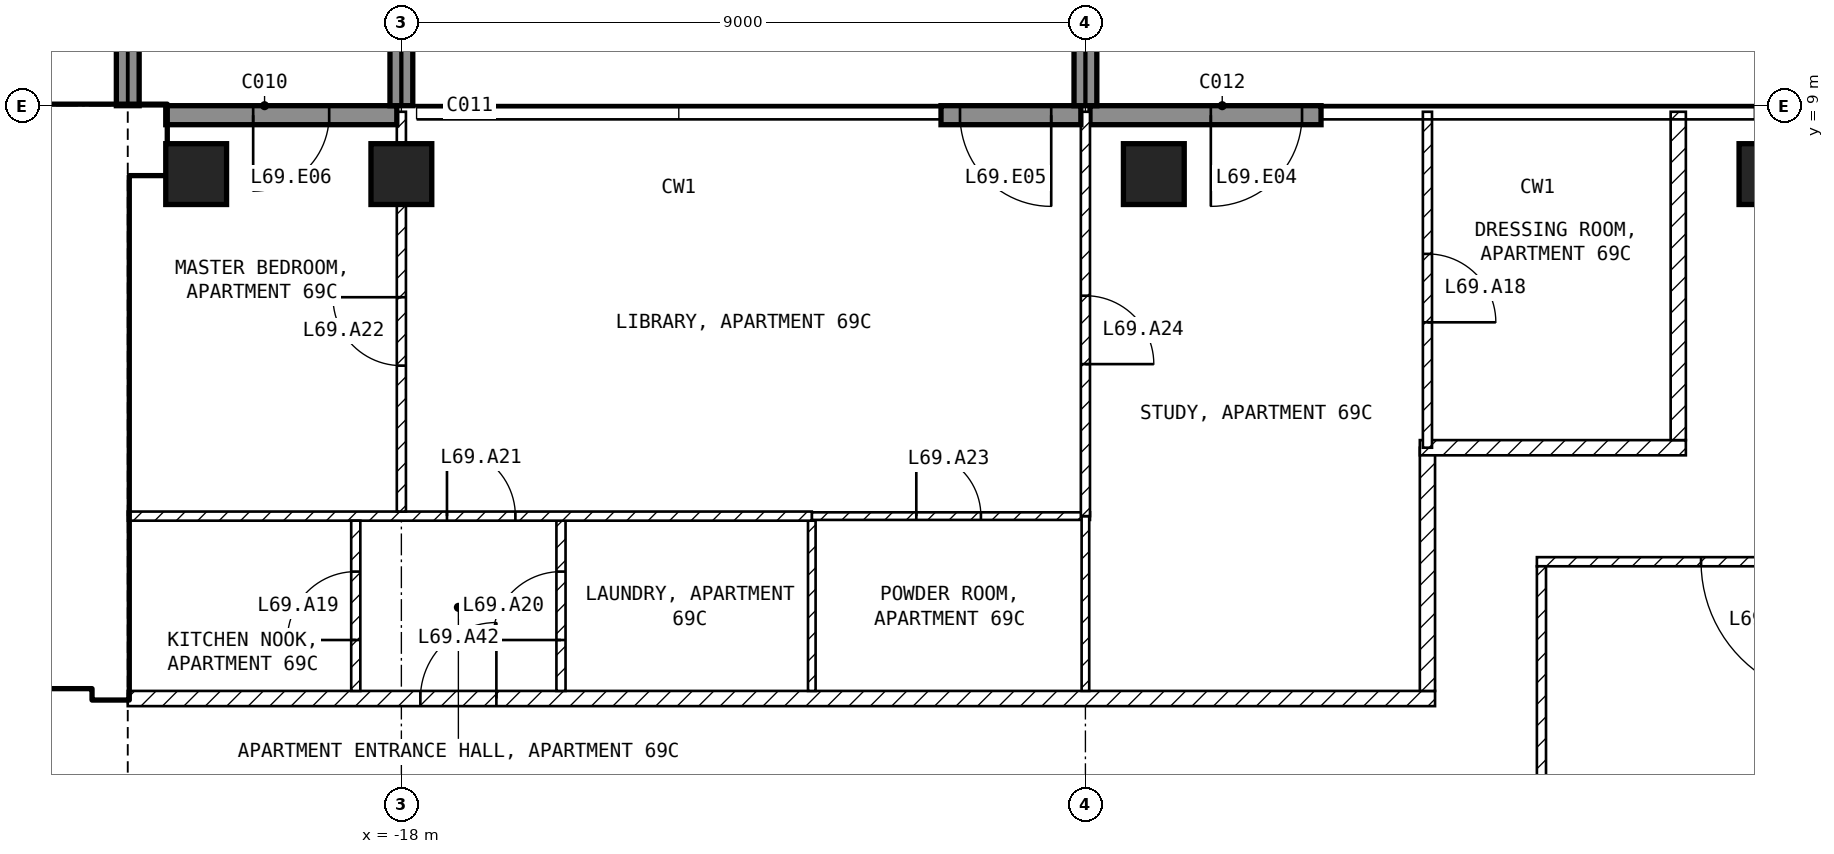
"""IFC4 building model, lengths in metres.
Left out: names, types, materials, properties, quantities, classifications, styles, units other than length and angle.
Written with IfcOpenShell. Run it as: python <this file> out.ifc"""

import sys

from ifc_helpers import new_model, si_unit, direction, frame, frame_2d, origin, origin_2d, place, context, subcontext, project, spatial, rectangle, extrude, element, fill, save


model = new_model("IFC4")
c1 = context("Model", 3, precision=1e-05, world=origin(), true_north=direction((0.0, 1.0)))
c2 = subcontext(c1, "Body", "Model", "MODEL_VIEW")
j1 = project(units=[si_unit("LENGTHUNIT", "METRE"), si_unit("PLANEANGLEUNIT", "RADIAN")], contexts=[c1])
p1 = place(None, origin())
s1 = spatial("IfcSite", under=j1, at=p1, CompositionType="ELEMENT")
p2 = place(p1, origin())
s2 = spatial("IfcBuilding", under=s1, at=p2, CompositionType="ELEMENT")
p3 = place(p2, frame((0.0, 0.0, 271.0)))
s3 = spatial("IfcBuildingStorey", under=s2, at=p3, CompositionType="ELEMENT", Elevation=271.0)
for number, where, z_axis, x_axis in (
    (1, (-20.7, 8.1, -0.25), (0.0, 0.0, 1.0), (1.0, 0.0, 0.0)),
    (2, (-18.0, 8.1, -0.25), (0.0, 0.0, 1.0), (1.0, 0.0, 0.0)),
    (3, (-8.1, 8.1, -0.25), (0.0, 0.0, 1.0), (1.0, 0.0, 0.0)),
    (4, (0.0, 8.1, -0.25), (0.0, 0.0, 1.0), (1.0, 0.0, 0.0)),
):
    element("IfcColumn", number, at=place(p3, frame(where, z_axis=z_axis, x_axis=x_axis)), inside=s3, PredefinedType="COLUMN", context=c2, shape_type="SweptSolid", body=[
        extrude(rectangle(XDim=0.8, YDim=0.8, at=origin_2d()), origin(), (0.0, 0.0, 1.0), 3.5),
    ])
p4 = place(p3, frame((-5.9, 8.875, 0.0), z_axis=(0.0, 0.0, 1.0), x_axis=(-1.0, 0.0, 0.0)))
e5 = element("IfcWall", 5, at=p4, inside=s3, PredefinedType="SOLIDWALL", context=c2, shape_type="SweptSolid", body=[
    extrude(rectangle(XDim=3.04, YDim=0.25, at=frame_2d((1.52, 0.0))), origin(), (0.0, 0.0, 1.0), 3.25),
])
p5 = place(p4, frame((0.25, 0.0, 0.0)))
e6 = element("IfcOpeningElement", 6, at=p5, cuts=e5, PredefinedType="OPENING", context=c2, shape_type="SweptSolid", body=[
    extrude(rectangle(XDim=1.2, YDim=2.4, at=frame_2d((0.6, 1.2))), frame((0.0, 0.135, 0.0), z_axis=(0.0, -1.0, 0.0), x_axis=(1.0, 0.0, 0.0)), (0.0, 0.0, 1.0), 0.27),
])
p6 = place(p3, frame((-9.06, 8.875, 0.0), z_axis=(0.0, 0.0, 1.0), x_axis=(-1.0, 0.0, 0.0)))
e7 = element("IfcWall", 7, at=p6, inside=s3, PredefinedType="SOLIDWALL", context=c2, shape_type="SweptSolid", body=[
    extrude(rectangle(XDim=1.84, YDim=0.25, at=frame_2d((0.92, 0.0))), origin(), (0.0, 0.0, 1.0), 3.25),
])
p7 = place(p6, frame((0.39, 0.0, 0.0)))
e8 = element("IfcOpeningElement", 8, at=p7, cuts=e7, PredefinedType="OPENING", context=c2, shape_type="SweptSolid", body=[
    extrude(rectangle(XDim=1.2, YDim=2.4, at=frame_2d((0.6, 1.2))), frame((0.0, 0.135, 0.0), z_axis=(0.0, -1.0, 0.0), x_axis=(1.0, 0.0, 0.0)), (0.0, 0.0, 1.0), 0.27),
])
p8 = place(p3, frame((-18.06, 8.875, 0.0), z_axis=(0.0, 0.0, 1.0), x_axis=(-1.0, 0.0, 0.0)))
e9 = element("IfcWall", 9, at=p8, inside=s3, PredefinedType="SOLIDWALL", context=c2, shape_type="SweptSolid", body=[
    extrude(rectangle(XDim=3.04, YDim=0.25, at=frame_2d((1.52, 0.0))), origin(), (0.0, 0.0, 1.0), 3.25),
])
p9 = place(p8, frame((0.89, 0.0, 0.0)))
e10 = element("IfcOpeningElement", 10, at=p9, cuts=e9, PredefinedType="OPENING", context=c2, shape_type="SweptSolid", body=[
    extrude(rectangle(XDim=1.0, YDim=2.4, at=frame_2d((0.5, 1.2))), frame((0.0, 0.135, 0.0), z_axis=(0.0, -1.0, 0.0), x_axis=(1.0, 0.0, 0.0)), (0.0, 0.0, 1.0), 0.27),
])
for number, where, z_axis, x_axis in (
    (11, (-21.6, 9.0, 0.0), (0.0, 0.0, 1.0), (0.0, 1.0, 0.0)),
    (12, (-18.0, 9.0, 0.0), (0.0, 0.0, 1.0), (0.0, 1.0, 0.0)),
    (13, (-9.0, 9.0, 0.0), (0.0, 0.0, 1.0), (0.0, 1.0, 0.0)),
):
    element("IfcWall", number, at=place(p3, frame(where, z_axis=z_axis, x_axis=x_axis)), inside=s3, PredefinedType="SOLIDWALL", context=c2, shape_type="SweptSolid", body=[
        extrude(rectangle(XDim=2.7, YDim=0.3, at=frame_2d((1.35, 0.0))), origin(), (0.0, 0.0, 1.0), 3.25),
    ])
p10 = place(p3, frame((-29.75, 8.55, 0.0), z_axis=(0.0, 0.0, 1.0), x_axis=(1.0, 0.0, 0.0)))
e14 = element("IfcWall", 14, at=p10, inside=s3, PredefinedType="SHEAR", context=c2, shape_type="SweptSolid", body=[
    extrude(rectangle(XDim=8.65, YDim=0.9, at=frame_2d((4.325, 0.0))), origin(), (0.0, 0.0, 1.0), 3.25),
])
p11 = place(p3, frame((-21.825, 1.2, 0.0), z_axis=(0.0, 0.0, 1.0), x_axis=(0.0, 1.0, 0.0)))
e15 = element("IfcWall", 15, at=p11, inside=s3, PredefinedType="SHEAR", context=c2, shape_type="SweptSolid", body=[
    extrude(rectangle(XDim=6.9, YDim=0.45, at=frame_2d((3.45, 0.0))), origin(), (0.0, 0.0, 1.0), 3.25),
])
p12 = place(p3, frame((-33.35, 1.45, 0.0), z_axis=(0.0, 0.0, 1.0), x_axis=(1.0, 0.0, 0.0)))
e16 = element("IfcWall", 16, at=p12, inside=s3, PredefinedType="SOLIDWALL", context=c2, shape_type="SweptSolid", body=[
    extrude(rectangle(XDim=11.3, YDim=0.2, at=frame_2d((5.65, 0.0))), origin(), (0.0, 0.0, 1.0), 3.25),
])
p13 = place(p12, frame((9.55, 0.0, 0.0)))
e17 = element("IfcOpeningElement", 17, at=p13, cuts=e16, PredefinedType="OPENING", context=c2, shape_type="SweptSolid", body=[
    extrude(rectangle(XDim=1.0, YDim=2.1, at=frame_2d((0.5, 1.05))), frame((0.0, 0.11, 0.0), z_axis=(0.0, -1.0, 0.0), x_axis=(1.0, 0.0, 0.0)), (0.0, 0.0, 1.0), 0.22),
])
p14 = place(p12, frame((7.05, 0.0, 0.0)))
e18 = element("IfcOpeningElement", 18, at=p14, cuts=e16, PredefinedType="OPENING", context=c2, shape_type="SweptSolid", body=[
    extrude(rectangle(XDim=1.0, YDim=2.1, at=frame_2d((0.5, 1.05))), frame((0.0, 0.11, 0.0), z_axis=(0.0, -1.0, 0.0), x_axis=(1.0, 0.0, 0.0)), (0.0, 0.0, 1.0), 0.22),
])
p15 = place(p12, frame((1.175, 0.0, 0.0)))
e19 = element("IfcOpeningElement", 19, at=p15, cuts=e16, PredefinedType="OPENING", context=c2, shape_type="SweptSolid", body=[
    extrude(rectangle(XDim=0.9, YDim=2.1, at=frame_2d((0.45, 1.05))), frame((0.0, 0.11, 0.0), z_axis=(0.0, -1.0, 0.0), x_axis=(1.0, 0.0, 0.0)), (0.0, 0.0, 1.0), 0.22),
])
p16 = place(p3, frame((-28.35, 5.15, 0.0), z_axis=(0.0, 0.0, 1.0), x_axis=(1.0, 0.0, 0.0)))
e20 = element("IfcWall", 20, at=p16, inside=s3, PredefinedType="SOLIDWALL", context=c2, shape_type="SweptSolid", body=[
    extrude(rectangle(XDim=6.3, YDim=0.2, at=frame_2d((3.15, 0.0))), origin(), (0.0, 0.0, 1.0), 3.25),
])
p17 = place(p16, frame((5.1, 0.0, 0.0)))
e21 = element("IfcOpeningElement", 21, at=p17, cuts=e20, PredefinedType="OPENING", context=c2, shape_type="SweptSolid", body=[
    extrude(rectangle(XDim=1.0, YDim=2.1, at=frame_2d((0.5, 1.05))), frame((0.0, 0.11, 0.0), z_axis=(0.0, -1.0, 0.0), x_axis=(1.0, 0.0, 0.0)), (0.0, 0.0, 1.0), 0.22),
])
p18 = place(p3, frame((3.06, 3.0, 0.0), z_axis=(0.0, 0.0, 1.0), x_axis=(-1.0, 0.0, 0.0)))
e22 = element("IfcWall", 22, at=p18, inside=s3, PredefinedType="PARTITIONING", context=c2, shape_type="SweptSolid", body=[
    extrude(rectangle(XDim=6.12, YDim=0.12, at=frame_2d((3.06, 0.0))), origin(), (0.0, 0.0, 1.0), 3.25),
])
p19 = place(p18, frame((2.16, 0.0, 0.0)))
e23 = element("IfcOpeningElement", 23, at=p19, cuts=e22, PredefinedType="OPENING", context=c2, shape_type="SweptSolid", body=[
    extrude(rectangle(XDim=1.8, YDim=2.1, at=frame_2d((0.9, 1.05))), frame((0.0, 0.07, 0.0), z_axis=(0.0, -1.0, 0.0), x_axis=(1.0, 0.0, 0.0)), (0.0, 0.0, 1.0), 0.14),
])
p20 = place(p3, frame((-3.0, 2.94, 0.0), z_axis=(0.0, 0.0, 1.0), x_axis=(0.0, -1.0, 0.0)))
e24 = element("IfcWall", 24, at=p20, inside=s3, PredefinedType="PARTITIONING", context=c2, shape_type="SweptSolid", body=[
    extrude(rectangle(XDim=5.88, YDim=0.12, at=frame_2d((2.94, 0.0))), origin(), (0.0, 0.0, 1.0), 3.25),
])
p21 = place(p3, frame((-21.6, 1.2, 0.0), z_axis=(0.0, 0.0, 1.0), x_axis=(1.0, 0.0, 0.0)))
e25 = element("IfcWall", 25, at=p21, inside=s3, PredefinedType="PARTITIONING", context=c2, shape_type="SweptSolid", body=[
    extrude(rectangle(XDim=17.2, YDim=0.2, at=frame_2d((8.6, 0.0))), origin(), (0.0, 0.0, 1.0), 3.25),
])
p22 = place(p21, frame((3.85, 0.0, 0.0)))
e26 = element("IfcOpeningElement", 26, at=p22, cuts=e25, PredefinedType="OPENING", context=c2, shape_type="SweptSolid", body=[
    extrude(rectangle(XDim=1.0, YDim=2.1, at=frame_2d((0.5, 1.05))), frame((0.0, 0.11, 0.0), z_axis=(0.0, -1.0, 0.0), x_axis=(1.0, 0.0, 0.0)), (0.0, 0.0, 1.0), 0.22),
])
p23 = place(p3, frame((-4.5, 1.3, 0.0), z_axis=(0.0, 0.0, 1.0), x_axis=(0.0, 1.0, 0.0)))
e27 = element("IfcWall", 27, at=p23, inside=s3, PredefinedType="PARTITIONING", context=c2, shape_type="SweptSolid", body=[
    extrude(rectangle(XDim=3.2, YDim=0.2, at=frame_2d((1.6, 0.0))), origin(), (0.0, 0.0, 1.0), 3.25),
])
p24 = place(p3, frame((-4.6, 4.5, 0.0), z_axis=(0.0, 0.0, 1.0), x_axis=(1.0, 0.0, 0.0)))
e28 = element("IfcWall", 28, at=p24, inside=s3, PredefinedType="PARTITIONING", context=c2, shape_type="SweptSolid", body=[
    extrude(rectangle(XDim=3.5, YDim=0.2, at=frame_2d((1.75, 0.0))), origin(), (0.0, 0.0, 1.0), 3.25),
])
p25 = place(p3, frame((-1.2, 4.6, 0.0), z_axis=(0.0, 0.0, 1.0), x_axis=(0.0, 1.0, 0.0)))
e29 = element("IfcWall", 29, at=p25, inside=s3, PredefinedType="PARTITIONING", context=c2, shape_type="SweptSolid", body=[
    extrude(rectangle(XDim=4.32, YDim=0.2, at=frame_2d((2.16, 0.0))), origin(), (0.0, 0.0, 1.0), 3.25),
])
p26 = place(p3, frame((-12.6, 1.3, 0.0), z_axis=(0.0, 0.0, 1.0), x_axis=(0.0, 1.0, 0.0)))
e30 = element("IfcWall", 30, at=p26, inside=s3, PredefinedType="PARTITIONING", context=c2, shape_type="SweptSolid", body=[
    extrude(rectangle(XDim=2.24, YDim=0.1, at=frame_2d((1.12, 0.0))), origin(), (0.0, 0.0, 1.0), 3.25),
])
p27 = place(p3, frame((-12.6, 3.6, 0.0), z_axis=(0.0, 0.0, 1.0), x_axis=(1.0, 0.0, 0.0)))
e31 = element("IfcWall", 31, at=p27, inside=s3, PredefinedType="PARTITIONING", context=c2, shape_type="SweptSolid", body=[
    extrude(rectangle(XDim=3.66, YDim=0.1, at=frame_2d((1.83, 0.0))), origin(), (0.0, 0.0, 1.0), 3.25),
])
p28 = place(p27, frame((1.375, 0.0, 0.0)))
e32 = element("IfcOpeningElement", 32, at=p28, cuts=e31, PredefinedType="OPENING", context=c2, shape_type="SweptSolid", body=[
    extrude(rectangle(XDim=0.85, YDim=2.1, at=frame_2d((0.425, 1.05))), frame((0.0, 0.06, 0.0), z_axis=(0.0, -1.0, 0.0), x_axis=(1.0, 0.0, 0.0)), (0.0, 0.0, 1.0), 0.12),
])
p29 = place(p3, frame((-9.0, 3.6, 0.0), z_axis=(0.0, 0.0, 1.0), x_axis=(0.0, -1.0, 0.0)))
e33 = element("IfcWall", 33, at=p29, inside=s3, PredefinedType="PARTITIONING", context=c2, shape_type="SweptSolid", body=[
    extrude(rectangle(XDim=2.3, YDim=0.1, at=frame_2d((1.15, 0.0))), origin(), (0.0, 0.0, 1.0), 3.25),
])
p30 = place(p3, frame((-15.9, 1.3, 0.0), z_axis=(0.0, 0.0, 1.0), x_axis=(0.0, 1.0, 0.0)))
e34 = element("IfcWall", 34, at=p30, inside=s3, PredefinedType="PARTITIONING", context=c2, shape_type="SweptSolid", body=[
    extrude(rectangle(XDim=2.24, YDim=0.12, at=frame_2d((1.12, 0.0))), origin(), (0.0, 0.0, 1.0), 3.25),
])
p31 = place(p30, frame((0.67, 0.0, 0.0)))
e35 = element("IfcOpeningElement", 35, at=p31, cuts=e34, PredefinedType="OPENING", context=c2, shape_type="SweptSolid", body=[
    extrude(rectangle(XDim=0.9, YDim=2.1, at=frame_2d((0.45, 1.05))), frame((0.0, 0.07, 0.0), z_axis=(0.0, -1.0, 0.0), x_axis=(1.0, 0.0, 0.0)), (0.0, 0.0, 1.0), 0.14),
])
p32 = place(p3, frame((-21.6, 3.6, 0.0), z_axis=(0.0, 0.0, 1.0), x_axis=(1.0, 0.0, 0.0)))
e36 = element("IfcWall", 36, at=p32, inside=s3, PredefinedType="PARTITIONING", context=c2, shape_type="SweptSolid", body=[
    extrude(rectangle(XDim=9.0, YDim=0.12, at=frame_2d((4.5, 0.0))), origin(), (0.0, 0.0, 1.0), 3.25),
])
p33 = place(p32, frame((4.2, 0.0, 0.0)))
e37 = element("IfcOpeningElement", 37, at=p33, cuts=e36, PredefinedType="OPENING", context=c2, shape_type="SweptSolid", body=[
    extrude(rectangle(XDim=0.9, YDim=2.1, at=frame_2d((0.45, 1.05))), frame((0.0, 0.07, 0.0), z_axis=(0.0, -1.0, 0.0), x_axis=(1.0, 0.0, 0.0)), (0.0, 0.0, 1.0), 0.14),
])
p34 = place(p3, frame((-18.6, 1.3, 0.0), z_axis=(0.0, 0.0, 1.0), x_axis=(0.0, 1.0, 0.0)))
e38 = element("IfcWall", 38, at=p34, inside=s3, PredefinedType="PARTITIONING", context=c2, shape_type="SweptSolid", body=[
    extrude(rectangle(XDim=2.24, YDim=0.12, at=frame_2d((1.12, 0.0))), origin(), (0.0, 0.0, 1.0), 3.25),
])
p35 = place(p34, frame((0.67, 0.0, 0.0)))
e39 = element("IfcOpeningElement", 39, at=p35, cuts=e38, PredefinedType="OPENING", context=c2, shape_type="SweptSolid", body=[
    extrude(rectangle(XDim=0.9, YDim=2.1, at=frame_2d((0.45, 1.05))), frame((0.0, 0.07, 0.0), z_axis=(0.0, -1.0, 0.0), x_axis=(1.0, 0.0, 0.0)), (0.0, 0.0, 1.0), 0.14),
])
p36 = place(p3, frame((-18.0, 3.66, 0.0), z_axis=(0.0, 0.0, 1.0), x_axis=(0.0, 1.0, 0.0)))
e40 = element("IfcWall", 40, at=p36, inside=s3, PredefinedType="PARTITIONING", context=c2, shape_type="SweptSolid", body=[
    extrude(rectangle(XDim=5.26, YDim=0.12, at=frame_2d((2.63, 0.0))), origin(), (0.0, 0.0, 1.0), 2.496),
])
p37 = place(p36, frame((1.92, 0.0, 0.0)))
e41 = element("IfcOpeningElement", 41, at=p37, cuts=e40, PredefinedType="OPENING", context=c2, shape_type="SweptSolid", body=[
    extrude(rectangle(XDim=0.9, YDim=2.1, at=frame_2d((0.45, 1.05))), frame((0.0, 0.07, 0.0), z_axis=(0.0, -1.0, 0.0), x_axis=(1.0, 0.0, 0.0)), (0.0, 0.0, 1.0), 0.14),
])
p38 = place(p3, frame((-9.0, 8.92, 0.0), z_axis=(0.0, 0.0, 1.0), x_axis=(0.0, -1.0, 0.0)))
e42 = element("IfcWall", 42, at=p38, inside=s3, PredefinedType="PARTITIONING", context=c2, shape_type="SweptSolid", body=[
    extrude(rectangle(XDim=5.32, YDim=0.12, at=frame_2d((2.66, 0.0))), origin(), (0.0, 0.0, 1.0), 3.25),
])
p39 = place(p38, frame((2.42, 0.0, 0.0)))
e43 = element("IfcOpeningElement", 43, at=p39, cuts=e42, PredefinedType="OPENING", context=c2, shape_type="SweptSolid", body=[
    extrude(rectangle(XDim=0.9, YDim=2.1, at=frame_2d((0.45, 1.05))), frame((0.0, 0.07, 0.0), z_axis=(0.0, -1.0, 0.0), x_axis=(1.0, 0.0, 0.0)), (0.0, 0.0, 1.0), 0.14),
])
p40 = place(p3, frame((-4.5, 8.92, 0.0), z_axis=(0.0, 0.0, 1.0), x_axis=(0.0, -1.0, 0.0)))
e44 = element("IfcWall", 44, at=p40, inside=s3, PredefinedType="PARTITIONING", context=c2, shape_type="SweptSolid", body=[
    extrude(rectangle(XDim=4.42, YDim=0.12, at=frame_2d((2.21, 0.0))), origin(), (0.0, 0.0, 1.0), 3.25),
])
p41 = place(p40, frame((1.87, 0.0, 0.0)))
e45 = element("IfcOpeningElement", 45, at=p41, cuts=e44, PredefinedType="OPENING", context=c2, shape_type="SweptSolid", body=[
    extrude(rectangle(XDim=0.9, YDim=2.1, at=frame_2d((0.45, 1.05))), frame((0.0, 0.07, 0.0), z_axis=(0.0, -1.0, 0.0), x_axis=(1.0, 0.0, 0.0)), (0.0, 0.0, 1.0), 0.14),
])
p42 = place(p5, origin())
e46 = element("IfcDoor", 46, at=p42, inside=s3, OperationType="SINGLE_SWING_RIGHT", PredefinedType="DOOR", context=c2, shape_type="SweptSolid", body=[
    extrude(rectangle(XDim=1.2, YDim=2.4, at=frame_2d((0.6, 1.2))), frame((0.0, 0.025, 0.0), z_axis=(0.0, -1.0, 0.0), x_axis=(1.0, 0.0, 0.0)), (0.0, 0.0, 1.0), 0.05),
])
fill(e6, e46)
p43 = place(p7, origin())
e47 = element("IfcDoor", 47, at=p43, inside=s3, OperationType="SINGLE_SWING_LEFT", PredefinedType="DOOR", context=c2, shape_type="SweptSolid", body=[
    extrude(rectangle(XDim=1.2, YDim=2.4, at=frame_2d((0.6, 1.2))), frame((0.0, 0.025, 0.0), z_axis=(0.0, -1.0, 0.0), x_axis=(1.0, 0.0, 0.0)), (0.0, 0.0, 1.0), 0.05),
])
fill(e8, e47)
p44 = place(p9, origin())
e48 = element("IfcDoor", 48, at=p44, inside=s3, OperationType="SINGLE_SWING_RIGHT", PredefinedType="DOOR", context=c2, shape_type="SweptSolid", body=[
    extrude(rectangle(XDim=1.0, YDim=2.4, at=frame_2d((0.5, 1.2))), frame((0.0, 0.025, 0.0), z_axis=(0.0, -1.0, 0.0), x_axis=(1.0, 0.0, 0.0)), (0.0, 0.0, 1.0), 0.05),
])
fill(e10, e48)
p45 = place(p17, origin())
e49 = element("IfcDoor", 49, at=p45, inside=s3, OperationType="SINGLE_SWING_LEFT", PredefinedType="DOOR", context=c2, shape_type="SweptSolid", body=[
    extrude(rectangle(XDim=1.0, YDim=2.1, at=frame_2d((0.5, 1.05))), frame((0.0, 0.025, 0.0), z_axis=(0.0, -1.0, 0.0), x_axis=(1.0, 0.0, 0.0)), (0.0, 0.0, 1.0), 0.05),
])
fill(e21, e49)
p46 = place(p19, origin())
e50 = element("IfcDoor", 50, at=p46, inside=s3, OperationType="SINGLE_SWING_LEFT", PredefinedType="DOOR", context=c2, shape_type="SweptSolid", body=[
    extrude(rectangle(XDim=1.8, YDim=2.1, at=frame_2d((0.9, 1.05))), frame((0.0, 0.025, 0.0), z_axis=(0.0, -1.0, 0.0), x_axis=(1.0, 0.0, 0.0)), (0.0, 0.0, 1.0), 0.05),
])
fill(e23, e50)
p47 = place(p41, origin())
e51 = element("IfcDoor", 51, at=p47, inside=s3, OperationType="SINGLE_SWING_RIGHT", PredefinedType="DOOR", context=c2, shape_type="SweptSolid", body=[
    extrude(rectangle(XDim=0.9, YDim=2.1, at=frame_2d((0.45, 1.05))), frame((0.0, 0.025, 0.0), z_axis=(0.0, -1.0, 0.0), x_axis=(1.0, 0.0, 0.0)), (0.0, 0.0, 1.0), 0.05),
])
fill(e45, e51)
p48 = place(p35, origin())
e52 = element("IfcDoor", 52, at=p48, inside=s3, OperationType="SINGLE_SWING_LEFT", PredefinedType="DOOR", context=c2, shape_type="SweptSolid", body=[
    extrude(rectangle(XDim=0.9, YDim=2.1, at=frame_2d((0.45, 1.05))), frame((0.0, 0.025, 0.0), z_axis=(0.0, -1.0, 0.0), x_axis=(1.0, 0.0, 0.0)), (0.0, 0.0, 1.0), 0.05),
])
fill(e39, e52)
p49 = place(p31, origin())
e53 = element("IfcDoor", 53, at=p49, inside=s3, OperationType="SINGLE_SWING_LEFT", PredefinedType="DOOR", context=c2, shape_type="SweptSolid", body=[
    extrude(rectangle(XDim=0.9, YDim=2.1, at=frame_2d((0.45, 1.05))), frame((0.0, 0.025, 0.0), z_axis=(0.0, -1.0, 0.0), x_axis=(1.0, 0.0, 0.0)), (0.0, 0.0, 1.0), 0.05),
])
fill(e35, e53)
p50 = place(p33, origin())
e54 = element("IfcDoor", 54, at=p50, inside=s3, OperationType="SINGLE_SWING_LEFT", PredefinedType="DOOR", context=c2, shape_type="SweptSolid", body=[
    extrude(rectangle(XDim=0.9, YDim=2.1, at=frame_2d((0.45, 1.05))), frame((0.0, 0.025, 0.0), z_axis=(0.0, -1.0, 0.0), x_axis=(1.0, 0.0, 0.0)), (0.0, 0.0, 1.0), 0.05),
])
fill(e37, e54)
p51 = place(p37, origin())
e55 = element("IfcDoor", 55, at=p51, inside=s3, OperationType="SINGLE_SWING_RIGHT", PredefinedType="DOOR", context=c2, shape_type="SweptSolid", body=[
    extrude(rectangle(XDim=0.9, YDim=2.1, at=frame_2d((0.45, 1.05))), frame((0.0, 0.025, 0.0), z_axis=(0.0, -1.0, 0.0), x_axis=(1.0, 0.0, 0.0)), (0.0, 0.0, 1.0), 0.05),
])
fill(e41, e55)
p52 = place(p28, origin())
e56 = element("IfcDoor", 56, at=p52, inside=s3, OperationType="SINGLE_SWING_LEFT", PredefinedType="DOOR", context=c2, shape_type="SweptSolid", body=[
    extrude(rectangle(XDim=0.85, YDim=2.1, at=frame_2d((0.425, 1.05))), frame((0.0, 0.025, 0.0), z_axis=(0.0, -1.0, 0.0), x_axis=(1.0, 0.0, 0.0)), (0.0, 0.0, 1.0), 0.05),
])
fill(e32, e56)
p53 = place(p39, origin())
e57 = element("IfcDoor", 57, at=p53, inside=s3, OperationType="SINGLE_SWING_RIGHT", PredefinedType="DOOR", context=c2, shape_type="SweptSolid", body=[
    extrude(rectangle(XDim=0.9, YDim=2.1, at=frame_2d((0.45, 1.05))), frame((0.0, 0.025, 0.0), z_axis=(0.0, -1.0, 0.0), x_axis=(1.0, 0.0, 0.0)), (0.0, 0.0, 1.0), 0.05),
])
fill(e43, e57)
p54 = place(p22, origin())
e58 = element("IfcDoor", 58, at=p54, inside=s3, OperationType="SINGLE_SWING_RIGHT", PredefinedType="DOOR", context=c2, shape_type="SweptSolid", body=[
    extrude(rectangle(XDim=1.0, YDim=2.1, at=frame_2d((0.5, 1.05))), frame((0.0, 0.025, 0.0), z_axis=(0.0, -1.0, 0.0), x_axis=(1.0, 0.0, 0.0)), (0.0, 0.0, 1.0), 0.05),
])
fill(e26, e58)
save(model, sys.argv[1])
